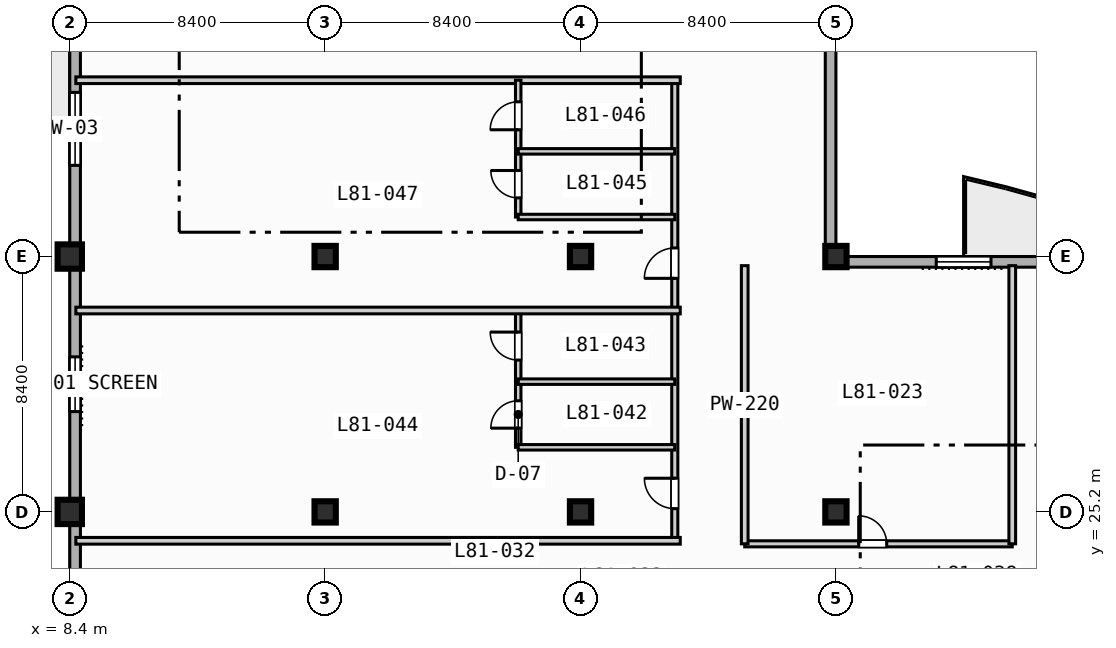
"""IFC4 building model, lengths in metres.
Left out: names, types, materials, properties, quantities, classifications, styles, units other than length and angle.
Written with IfcOpenShell. Run it as: python <this file> out.ifc"""

import sys

from ifc_helpers import new_model, si_unit, direction, frame, frame_2d, origin, origin_2d, place, context, subcontext, project, spatial, rectangle, extrude, element, fill, save


model = new_model("IFC4")
c1 = context("Model", 3, precision=1e-05, world=origin(), true_north=direction((0.0, 1.0)))
c2 = subcontext(c1, "Body", "Model", "MODEL_VIEW")
j1 = project(units=[si_unit("LENGTHUNIT", "METRE"), si_unit("PLANEANGLEUNIT", "RADIAN")], contexts=[c1])
p1 = place(None, origin())
s1 = spatial("IfcSite", under=j1, at=p1, CompositionType="ELEMENT")
p2 = place(p1, origin())
s2 = spatial("IfcBuilding", under=s1, at=p2, CompositionType="ELEMENT")
p3 = place(p2, frame((0.0, 0.0, 328.1)))
s3 = spatial("IfcBuildingStorey", under=s2, at=p3, CompositionType="ELEMENT", Elevation=328.1)
for number, where, z_axis, x_axis in (
    (1, (8.4, 25.2, 0.0), (0.0, 0.0, 1.0), (1.0, 0.0, 0.0)),
    (2, (8.4, 33.6, 0.0), (0.0, 0.0, 1.0), (1.0, 0.0, 0.0)),
):
    element("IfcColumn", number, at=place(p3, frame(where, z_axis=z_axis, x_axis=x_axis)), inside=s3, PredefinedType="COLUMN", context=c2, shape_type="SweptSolid", body=[
        extrude(rectangle(XDim=0.8, YDim=0.8, at=origin_2d()), origin(), (0.0, 0.0, 1.0), 3.9),
    ])
for number, where, z_axis, x_axis in (
    (3, (16.8, 25.2, 0.0), (0.0, 0.0, 1.0), (1.0, 0.0, 0.0)),
    (4, (16.8, 33.6, 0.0), (0.0, 0.0, 1.0), (1.0, 0.0, 0.0)),
    (5, (25.2, 25.2, 0.0), (0.0, 0.0, 1.0), (1.0, 0.0, 0.0)),
    (6, (25.2, 33.6, 0.0), (0.0, 0.0, 1.0), (1.0, 0.0, 0.0)),
    (7, (33.6, 25.2, 0.0), (0.0, 0.0, 1.0), (1.0, 0.0, 0.0)),
    (8, (33.6, 33.6, 0.0), (0.0, 0.0, 1.0), (1.0, 0.0, 0.0)),
):
    element("IfcColumn", number, at=place(p3, frame(where, z_axis=z_axis, x_axis=x_axis)), inside=s3, PredefinedType="COLUMN", context=c2, shape_type="SweptSolid", body=[
        extrude(rectangle(XDim=0.7, YDim=0.7, at=origin_2d()), origin(), (0.0, 0.0, 1.0), 3.9),
    ])
p4 = place(p3, frame((8.575, 11.575, 0.0), z_axis=(0.0, 0.0, 1.0), x_axis=(0.0, 1.0, 0.0)))
e9 = element("IfcWall", 9, at=p4, inside=s3, PredefinedType="STANDARD", context=c2, shape_type="SweptSolid", body=[
    extrude(rectangle(XDim=60.85, YDim=0.35, at=frame_2d((30.425, 0.0))), origin(), (0.0, 0.0, 1.0), 3.67),
])
p5 = place(p4, frame((33.925, 0.0, 0.0)))
e10 = element("IfcOpeningElement", 10, at=p5, cuts=e9, PredefinedType="OPENING", context=c2, shape_type="SweptSolid", body=[
    extrude(rectangle(XDim=1.4, YDim=2.2, at=frame_2d((0.7, 1.1))), frame((0.0, 0.185, 0.0), z_axis=(0.0, -1.0, 0.0), x_axis=(1.0, 0.0, 0.0)), (0.0, 0.0, 1.0), 0.37),
])
p6 = place(p4, frame((16.925, 0.0, 0.85)))
e11 = element("IfcOpeningElement", 11, at=p6, cuts=e9, PredefinedType="OPENING", context=c2, shape_type="SweptSolid", body=[
    extrude(rectangle(XDim=1.8, YDim=1.8, at=frame_2d((0.9, 0.9))), frame((0.0, 0.185, 0.0), z_axis=(0.0, -1.0, 0.0), x_axis=(1.0, 0.0, 0.0)), (0.0, 0.0, 1.0), 0.37),
])
p7 = place(p4, frame((25.025, 0.0, 0.85)))
e12 = element("IfcOpeningElement", 12, at=p7, cuts=e9, PredefinedType="OPENING", context=c2, shape_type="SweptSolid", body=[
    extrude(rectangle(XDim=2.4, YDim=1.95, at=frame_2d((1.2, 0.975))), frame((0.0, 0.185, 0.0), z_axis=(0.0, -1.0, 0.0), x_axis=(1.0, 0.0, 0.0)), (0.0, 0.0, 1.0), 0.37),
])
p8 = place(p4, frame((41.825, 0.0, 0.85)))
e13 = element("IfcOpeningElement", 13, at=p8, cuts=e9, PredefinedType="OPENING", context=c2, shape_type="SweptSolid", body=[
    extrude(rectangle(XDim=2.4, YDim=1.95, at=frame_2d((1.2, 0.975))), frame((0.0, 0.185, 0.0), z_axis=(0.0, -1.0, 0.0), x_axis=(1.0, 0.0, 0.0)), (0.0, 0.0, 1.0), 0.37),
])
p9 = place(p3, frame((33.425, 72.425, 0.0), z_axis=(0.0, 0.0, 1.0), x_axis=(0.0, -1.0, 0.0)))
e14 = element("IfcWall", 14, at=p9, inside=s3, PredefinedType="STANDARD", context=c2, shape_type="SweptSolid", body=[
    extrude(rectangle(XDim=39.0, YDim=0.35, at=frame_2d((19.5, 0.0))), origin(), (0.0, 0.0, 1.0), 3.67),
])
p10 = place(p9, frame((5.9, 0.0, 0.85)))
e15 = element("IfcOpeningElement", 15, at=p10, cuts=e14, PredefinedType="OPENING", context=c2, shape_type="SweptSolid", body=[
    extrude(rectangle(XDim=1.8, YDim=1.8, at=frame_2d((0.9, 0.9))), frame((0.0, 0.185, 0.0), z_axis=(0.0, -1.0, 0.0), x_axis=(1.0, 0.0, 0.0)), (0.0, 0.0, 1.0), 0.37),
])
p11 = place(p3, frame((33.425, 33.425, 0.0), z_axis=(0.0, 0.0, 1.0), x_axis=(1.0, 0.0, 0.0)))
e16 = element("IfcWall", 16, at=p11, inside=s3, PredefinedType="STANDARD", context=c2, shape_type="SweptSolid", body=[
    extrude(rectangle(XDim=30.6, YDim=0.35, at=frame_2d((15.3, 0.0))), origin(), (0.0, 0.0, 1.0), 3.67),
])
p12 = place(p11, frame((12.075, 0.0, 0.0)))
e17 = element("IfcOpeningElement", 17, at=p12, cuts=e16, PredefinedType="OPENING", context=c2, shape_type="SweptSolid", body=[
    extrude(rectangle(XDim=1.4, YDim=2.2, at=frame_2d((0.7, 1.1))), frame((0.0, 0.185, 0.0), z_axis=(0.0, -1.0, 0.0), x_axis=(1.0, 0.0, 0.0)), (0.0, 0.0, 1.0), 0.37),
])
p13 = place(p11, frame((3.475, 0.0, 0.85)))
e18 = element("IfcOpeningElement", 18, at=p13, cuts=e16, PredefinedType="OPENING", context=c2, shape_type="SweptSolid", body=[
    extrude(rectangle(XDim=1.8, YDim=1.8, at=frame_2d((0.9, 0.9))), frame((0.0, 0.185, 0.0), z_axis=(0.0, -1.0, 0.0), x_axis=(1.0, 0.0, 0.0)), (0.0, 0.0, 1.0), 0.37),
])
p14 = place(p3, frame((30.6, 24.15, 0.0), z_axis=(0.0, 0.0, 1.0), x_axis=(1.0, 0.0, 0.0)))
e19 = element("IfcWall", 19, at=p14, inside=s3, PredefinedType="PARTITIONING", context=c2, shape_type="SweptSolid", body=[
    extrude(rectangle(XDim=8.8, YDim=0.2, at=frame_2d((4.4, 0.0))), origin(), (0.0, 0.0, 1.0), 3.67),
])
p15 = place(p14, frame((3.75, 0.0, 0.0)))
e20 = element("IfcOpeningElement", 20, at=p15, cuts=e19, PredefinedType="OPENING", context=c2, shape_type="SweptSolid", body=[
    extrude(rectangle(XDim=0.92, YDim=2.1, at=frame_2d((0.46, 1.05))), frame((0.0, 0.11, 0.0), z_axis=(0.0, -1.0, 0.0), x_axis=(1.0, 0.0, 0.0)), (0.0, 0.0, 1.0), 0.22),
])
for number, where, z_axis, x_axis in (
    (21, (30.6, 24.15, 0.0), (0.0, 0.0, 1.0), (0.0, 1.0, 0.0)),
    (22, (39.4, 24.15, 0.0), (0.0, 0.0, 1.0), (0.0, 1.0, 0.0)),
):
    element("IfcWall", number, at=place(p3, frame(where, z_axis=z_axis, x_axis=x_axis)), inside=s3, PredefinedType="PARTITIONING", context=c2, shape_type="SweptSolid", body=[
        extrude(rectangle(XDim=9.15, YDim=0.22, at=frame_2d((4.575, 0.0))), origin(), (0.0, 0.0, 1.0), 3.67),
    ])
p16 = place(p3, frame((28.3, 24.25, 0.0), z_axis=(0.0, 0.0, 1.0), x_axis=(0.0, 1.0, 0.0)))
e23 = element("IfcWall", 23, at=p16, inside=s3, PredefinedType="PARTITIONING", context=c2, shape_type="SweptSolid", body=[
    extrude(rectangle(XDim=15.15, YDim=0.2, at=frame_2d((7.575, 0.0))), origin(), (0.0, 0.0, 1.0), 3.67),
])
p17 = place(p16, frame((1.058, 0.0, 0.0)))
e24 = element("IfcOpeningElement", 24, at=p17, cuts=e23, PredefinedType="OPENING", context=c2, shape_type="SweptSolid", body=[
    extrude(rectangle(XDim=1.0, YDim=2.15, at=frame_2d((0.5, 1.075))), frame((0.0, 0.11, 0.0), z_axis=(0.0, -1.0, 0.0), x_axis=(1.0, 0.0, 0.0)), (0.0, 0.0, 1.0), 0.22),
])
p18 = place(p16, frame((8.633, 0.0, 0.0)))
e25 = element("IfcOpeningElement", 25, at=p18, cuts=e23, PredefinedType="OPENING", context=c2, shape_type="SweptSolid", body=[
    extrude(rectangle(XDim=1.0, YDim=2.15, at=frame_2d((0.5, 1.075))), frame((0.0, 0.11, 0.0), z_axis=(0.0, -1.0, 0.0), x_axis=(1.0, 0.0, 0.0)), (0.0, 0.0, 1.0), 0.22),
])
p19 = place(p3, frame((8.6, 24.25, 0.0), z_axis=(0.0, 0.0, 1.0), x_axis=(1.0, 0.0, 0.0)))
e26 = element("IfcWall", 26, at=p19, inside=s3, PredefinedType="PARTITIONING", context=c2, shape_type="SweptSolid", body=[
    extrude(rectangle(XDim=19.88, YDim=0.22, at=frame_2d((9.94, 0.0))), origin(), (0.0, 0.0, 1.0), 3.67),
])
p20 = place(p3, frame((23.15, 27.325, 0.0), z_axis=(0.0, 0.0, 1.0), x_axis=(0.0, 1.0, 0.0)))
e27 = element("IfcWall", 27, at=p20, inside=s3, PredefinedType="PLUMBINGWALL", context=c2, shape_type="SweptSolid", body=[
    extrude(rectangle(XDim=4.5, YDim=0.18, at=frame_2d((2.25, 0.0))), origin(), (0.0, 0.0, 1.0), 3.67),
])
p21 = place(p20, frame((0.63, 0.0, 0.0)))
e28 = element("IfcOpeningElement", 28, at=p21, cuts=e27, PredefinedType="OPENING", context=c2, shape_type="SweptSolid", body=[
    extrude(rectangle(XDim=0.9, YDim=2.1, at=frame_2d((0.45, 1.05))), frame((0.0, 0.1, 0.0), z_axis=(0.0, -1.0, 0.0), x_axis=(1.0, 0.0, 0.0)), (0.0, 0.0, 1.0), 0.2),
])
p22 = place(p20, frame((2.87, 0.0, 0.0)))
e29 = element("IfcOpeningElement", 29, at=p22, cuts=e27, PredefinedType="OPENING", context=c2, shape_type="SweptSolid", body=[
    extrude(rectangle(XDim=0.92, YDim=2.1, at=frame_2d((0.46, 1.05))), frame((0.0, 0.1, 0.0), z_axis=(0.0, -1.0, 0.0), x_axis=(1.0, 0.0, 0.0)), (0.0, 0.0, 1.0), 0.2),
])
for number, where, z_axis, x_axis in (
    (30, (23.15, 27.325, 0.0), (0.0, 0.0, 1.0), (1.0, 0.0, 0.0)),
    (31, (23.15, 29.485, 0.0), (0.0, 0.0, 1.0), (1.0, 0.0, 0.0)),
):
    element("IfcWall", number, at=place(p3, frame(where, z_axis=z_axis, x_axis=x_axis)), inside=s3, PredefinedType="PLUMBINGWALL", context=c2, shape_type="SweptSolid", body=[
        extrude(rectangle(XDim=5.15, YDim=0.18, at=frame_2d((2.575, 0.0))), origin(), (0.0, 0.0, 1.0), 3.67),
    ])
for number, where, z_axis, x_axis in (
    (32, (8.6, 31.825, 0.0), (0.0, 0.0, 1.0), (1.0, 0.0, 0.0)),
    (33, (8.6, 39.4, 0.0), (0.0, 0.0, 1.0), (1.0, 0.0, 0.0)),
):
    element("IfcWall", number, at=place(p3, frame(where, z_axis=z_axis, x_axis=x_axis)), inside=s3, PredefinedType="PARTITIONING", context=c2, shape_type="SweptSolid", body=[
        extrude(rectangle(XDim=19.88, YDim=0.22, at=frame_2d((9.94, 0.0))), origin(), (0.0, 0.0, 1.0), 3.67),
    ])
p23 = place(p3, frame((23.15, 34.9, 0.0), z_axis=(0.0, 0.0, 1.0), x_axis=(0.0, 1.0, 0.0)))
e34 = element("IfcWall", 34, at=p23, inside=s3, PredefinedType="PLUMBINGWALL", context=c2, shape_type="SweptSolid", body=[
    extrude(rectangle(XDim=4.5, YDim=0.18, at=frame_2d((2.25, 0.0))), origin(), (0.0, 0.0, 1.0), 3.67),
])
p24 = place(p23, frame((0.63, 0.0, 0.0)))
e35 = element("IfcOpeningElement", 35, at=p24, cuts=e34, PredefinedType="OPENING", context=c2, shape_type="SweptSolid", body=[
    extrude(rectangle(XDim=0.9, YDim=2.1, at=frame_2d((0.45, 1.05))), frame((0.0, 0.1, 0.0), z_axis=(0.0, -1.0, 0.0), x_axis=(1.0, 0.0, 0.0)), (0.0, 0.0, 1.0), 0.2),
])
p25 = place(p23, frame((2.87, 0.0, 0.0)))
e36 = element("IfcOpeningElement", 36, at=p25, cuts=e34, PredefinedType="OPENING", context=c2, shape_type="SweptSolid", body=[
    extrude(rectangle(XDim=0.92, YDim=2.1, at=frame_2d((0.46, 1.05))), frame((0.0, 0.1, 0.0), z_axis=(0.0, -1.0, 0.0), x_axis=(1.0, 0.0, 0.0)), (0.0, 0.0, 1.0), 0.2),
])
for number, where, z_axis, x_axis in (
    (37, (23.15, 34.9, 0.0), (0.0, 0.0, 1.0), (1.0, 0.0, 0.0)),
    (38, (23.15, 37.06, 0.0), (0.0, 0.0, 1.0), (1.0, 0.0, 0.0)),
):
    element("IfcWall", number, at=place(p3, frame(where, z_axis=z_axis, x_axis=x_axis)), inside=s3, PredefinedType="PLUMBINGWALL", context=c2, shape_type="SweptSolid", body=[
        extrude(rectangle(XDim=5.15, YDim=0.18, at=frame_2d((2.575, 0.0))), origin(), (0.0, 0.0, 1.0), 3.67),
    ])
p26 = place(p6, origin())
e39 = element("IfcWindow", 39, at=p26, inside=s3, PartitioningType="SINGLE_PANEL", PredefinedType="WINDOW", context=c2, shape_type="SweptSolid", body=[
    extrude(rectangle(XDim=1.8, YDim=1.8, at=frame_2d((0.9, 0.9))), frame((0.0, 0.03, 0.0), z_axis=(0.0, -1.0, 0.0), x_axis=(1.0, 0.0, 0.0)), (0.0, 0.0, 1.0), 0.06),
])
fill(e11, e39)
p27 = place(p7, origin())
e40 = element("IfcWindow", 40, at=p27, inside=s3, PartitioningType="SINGLE_PANEL", PredefinedType="WINDOW", context=c2, shape_type="SweptSolid", body=[
    extrude(rectangle(XDim=2.4, YDim=1.95, at=frame_2d((1.2, 0.975))), frame((0.0, 0.03, 0.0), z_axis=(0.0, -1.0, 0.0), x_axis=(1.0, 0.0, 0.0)), (0.0, 0.0, 1.0), 0.06),
])
fill(e12, e40)
p28 = place(p13, origin())
e41 = element("IfcWindow", 41, at=p28, inside=s3, PartitioningType="SINGLE_PANEL", PredefinedType="WINDOW", context=c2, shape_type="SweptSolid", body=[
    extrude(rectangle(XDim=1.8, YDim=1.8, at=frame_2d((0.9, 0.9))), frame((0.0, 0.03, 0.0), z_axis=(0.0, -1.0, 0.0), x_axis=(1.0, 0.0, 0.0)), (0.0, 0.0, 1.0), 0.06),
])
fill(e18, e41)
p29 = place(p15, origin())
e42 = element("IfcDoor", 42, at=p29, inside=s3, OperationType="SINGLE_SWING_LEFT", PredefinedType="DOOR", context=c2, shape_type="SweptSolid", body=[
    extrude(rectangle(XDim=0.92, YDim=2.1, at=frame_2d((0.46, 1.05))), frame((0.0, 0.025, 0.0), z_axis=(0.0, -1.0, 0.0), x_axis=(1.0, 0.0, 0.0)), (0.0, 0.0, 1.0), 0.05),
])
fill(e20, e42)
p30 = place(p17, origin())
e43 = element("IfcDoor", 43, at=p30, inside=s3, OperationType="SINGLE_SWING_RIGHT", PredefinedType="DOOR", context=c2, shape_type="SweptSolid", body=[
    extrude(rectangle(XDim=1.0, YDim=2.15, at=frame_2d((0.5, 1.075))), frame((0.0, 0.025, 0.0), z_axis=(0.0, -1.0, 0.0), x_axis=(1.0, 0.0, 0.0)), (0.0, 0.0, 1.0), 0.05),
])
fill(e24, e43)
p31 = place(p18, origin())
e44 = element("IfcDoor", 44, at=p31, inside=s3, OperationType="SINGLE_SWING_LEFT", PredefinedType="DOOR", context=c2, shape_type="SweptSolid", body=[
    extrude(rectangle(XDim=1.0, YDim=2.15, at=frame_2d((0.5, 1.075))), frame((0.0, 0.025, 0.0), z_axis=(0.0, -1.0, 0.0), x_axis=(1.0, 0.0, 0.0)), (0.0, 0.0, 1.0), 0.05),
])
fill(e25, e44)
p32 = place(p21, origin())
e45 = element("IfcDoor", 45, at=p32, inside=s3, OperationType="SINGLE_SWING_LEFT", PredefinedType="DOOR", context=c2, shape_type="SweptSolid", body=[
    extrude(rectangle(XDim=0.9, YDim=2.1, at=frame_2d((0.45, 1.05))), frame((0.0, 0.025, 0.0), z_axis=(0.0, -1.0, 0.0), x_axis=(1.0, 0.0, 0.0)), (0.0, 0.0, 1.0), 0.05),
])
fill(e28, e45)
p33 = place(p22, origin())
e46 = element("IfcDoor", 46, at=p33, inside=s3, OperationType="SINGLE_SWING_RIGHT", PredefinedType="DOOR", context=c2, shape_type="SweptSolid", body=[
    extrude(rectangle(XDim=0.92, YDim=2.1, at=frame_2d((0.46, 1.05))), frame((0.0, 0.025, 0.0), z_axis=(0.0, -1.0, 0.0), x_axis=(1.0, 0.0, 0.0)), (0.0, 0.0, 1.0), 0.05),
])
fill(e29, e46)
p34 = place(p24, origin())
e47 = element("IfcDoor", 47, at=p34, inside=s3, OperationType="SINGLE_SWING_RIGHT", PredefinedType="DOOR", context=c2, shape_type="SweptSolid", body=[
    extrude(rectangle(XDim=0.9, YDim=2.1, at=frame_2d((0.45, 1.05))), frame((0.0, 0.025, 0.0), z_axis=(0.0, -1.0, 0.0), x_axis=(1.0, 0.0, 0.0)), (0.0, 0.0, 1.0), 0.05),
])
fill(e35, e47)
p35 = place(p25, origin())
e48 = element("IfcDoor", 48, at=p35, inside=s3, OperationType="SINGLE_SWING_LEFT", PredefinedType="DOOR", context=c2, shape_type="SweptSolid", body=[
    extrude(rectangle(XDim=0.92, YDim=2.1, at=frame_2d((0.46, 1.05))), frame((0.0, 0.025, 0.0), z_axis=(0.0, -1.0, 0.0), x_axis=(1.0, 0.0, 0.0)), (0.0, 0.0, 1.0), 0.05),
])
fill(e36, e48)
save(model, sys.argv[1])
